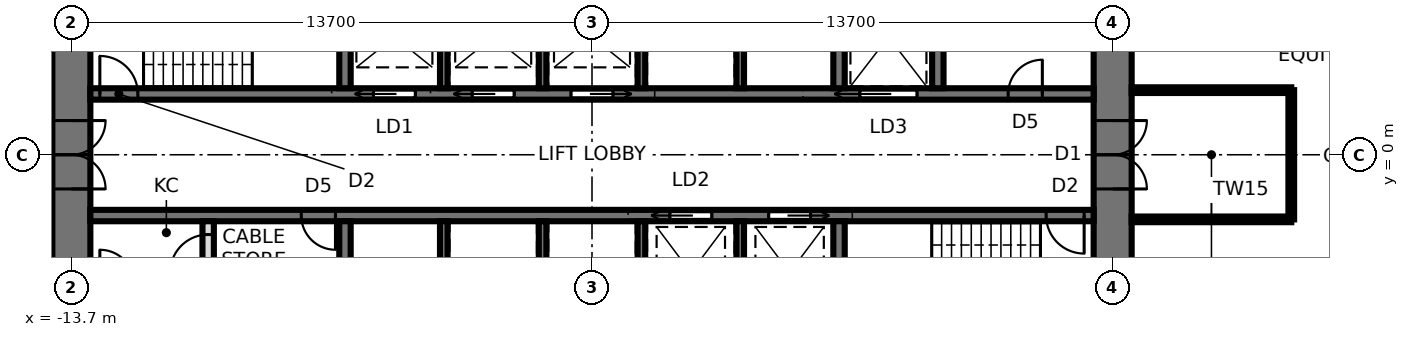
"""IFC4 building model, lengths in metres.
Left out: names, types, materials, properties, quantities, classifications, styles, units other than length and angle.
Written with IfcOpenShell. Run it as: python <this file> out.ifc"""

import sys

from ifc_helpers import new_model, si_unit, direction, frame, frame_2d, origin, place, context, subcontext, project, spatial, rectangle, extrude, element, fill, save


model = new_model("IFC4")
c1 = context("Model", 3, precision=1e-05, world=origin(), true_north=direction((0.0, 1.0)))
c2 = subcontext(c1, "Body", "Model", "MODEL_VIEW")
j1 = project(units=[si_unit("LENGTHUNIT", "METRE"), si_unit("PLANEANGLEUNIT", "RADIAN")], contexts=[c1])
p1 = place(None, origin())
s1 = spatial("IfcSite", under=j1, at=p1, CompositionType="ELEMENT")
p2 = place(p1, origin())
s2 = spatial("IfcBuilding", under=s1, at=p2, CompositionType="ELEMENT")
p3 = place(p2, frame((0.0, 0.0, 23.8)))
s3 = spatial("IfcBuildingStorey", under=s2, at=p3, CompositionType="ELEMENT", Elevation=23.8)
p4 = place(p3, frame((13.7, -9.5, 0.0), z_axis=(0.0, 0.0, 1.0), x_axis=(0.0, 1.0, 0.0)))
e1 = element("IfcWall", 1, at=p4, inside=s3, PredefinedType="SHEAR", context=c2, shape_type="SweptSolid", body=[
    extrude(rectangle(XDim=19.0, YDim=1.0, at=frame_2d((9.5, 0.0))), origin(), (0.0, 0.0, 1.0), 4.2),
])
p5 = place(p4, frame((8.6, 0.0, 0.0)))
e2 = element("IfcOpeningElement", 2, at=p5, cuts=e1, PredefinedType="OPENING", context=c2, shape_type="SweptSolid", body=[
    extrude(rectangle(XDim=1.8, YDim=2.4, at=frame_2d((0.9, 1.2))), frame((0.0, 0.51, 0.0), z_axis=(0.0, -1.0, 0.0), x_axis=(1.0, 0.0, 0.0)), (0.0, 0.0, 1.0), 1.02),
])
p6 = place(p3, frame((-13.7, 9.5, 0.0), z_axis=(0.0, 0.0, 1.0), x_axis=(0.0, -1.0, 0.0)))
e3 = element("IfcWall", 3, at=p6, inside=s3, PredefinedType="SHEAR", context=c2, shape_type="SweptSolid", body=[
    extrude(rectangle(XDim=19.0, YDim=1.0, at=frame_2d((9.5, 0.0))), origin(), (0.0, 0.0, 1.0), 4.2),
])
p7 = place(p6, frame((8.6, 0.0, 0.0)))
e4 = element("IfcOpeningElement", 4, at=p7, cuts=e3, PredefinedType="OPENING", context=c2, shape_type="SweptSolid", body=[
    extrude(rectangle(XDim=1.8, YDim=2.4, at=frame_2d((0.9, 1.2))), frame((0.0, 0.51, 0.0), z_axis=(0.0, -1.0, 0.0), x_axis=(1.0, 0.0, 0.0)), (0.0, 0.0, 1.0), 1.02),
])
p8 = place(p3, frame((-13.2, 1.6, 0.0), z_axis=(0.0, 0.0, 1.0), x_axis=(1.0, 0.0, 0.0)))
e5 = element("IfcWall", 5, at=p8, inside=s3, PredefinedType="SHEAR", context=c2, shape_type="SweptSolid", body=[
    extrude(rectangle(XDim=26.4, YDim=0.3, at=frame_2d((13.2, 0.0))), origin(), (0.0, 0.0, 1.0), 4.2),
])
p9 = place(p8, frame((0.25, 0.0, 0.0)))
e6 = element("IfcOpeningElement", 6, at=p9, cuts=e5, PredefinedType="OPENING", context=c2, shape_type="SweptSolid", body=[
    extrude(rectangle(XDim=1.0, YDim=2.1, at=frame_2d((0.5, 1.05))), frame((0.0, 0.16, 0.0), z_axis=(0.0, -1.0, 0.0), x_axis=(1.0, 0.0, 0.0)), (0.0, 0.0, 1.0), 0.32),
])
p10 = place(p8, frame((20.25, 0.0, 0.0)))
e7 = element("IfcOpeningElement", 7, at=p10, cuts=e5, PredefinedType="OPENING", context=c2, shape_type="SweptSolid", body=[
    extrude(rectangle(XDim=1.5, YDim=2.4, at=frame_2d((0.75, 1.2))), frame((0.0, 0.16, 0.0), z_axis=(0.0, -1.0, 0.0), x_axis=(1.0, 0.0, 0.0)), (0.0, 0.0, 1.0), 0.32),
])
p11 = place(p8, frame((7.45, 0.0, 0.0)))
e8 = element("IfcOpeningElement", 8, at=p11, cuts=e5, PredefinedType="OPENING", context=c2, shape_type="SweptSolid", body=[
    extrude(rectangle(XDim=1.1, YDim=2.3, at=frame_2d((0.55, 1.15))), frame((0.0, 0.16, 0.0), z_axis=(0.0, -1.0, 0.0), x_axis=(1.0, 0.0, 0.0)), (0.0, 0.0, 1.0), 0.32),
])
p12 = place(p8, frame((10.05, 0.0, 0.0)))
e9 = element("IfcOpeningElement", 9, at=p12, cuts=e5, PredefinedType="OPENING", context=c2, shape_type="SweptSolid", body=[
    extrude(rectangle(XDim=1.1, YDim=2.3, at=frame_2d((0.55, 1.15))), frame((0.0, 0.16, 0.0), z_axis=(0.0, -1.0, 0.0), x_axis=(1.0, 0.0, 0.0)), (0.0, 0.0, 1.0), 0.32),
])
p13 = place(p8, frame((12.65, 0.0, 0.0)))
e10 = element("IfcOpeningElement", 10, at=p13, cuts=e5, PredefinedType="OPENING", context=c2, shape_type="SweptSolid", body=[
    extrude(rectangle(XDim=1.1, YDim=2.3, at=frame_2d((0.55, 1.15))), frame((0.0, 0.16, 0.0), z_axis=(0.0, -1.0, 0.0), x_axis=(1.0, 0.0, 0.0)), (0.0, 0.0, 1.0), 0.32),
])
p14 = place(p8, frame((24.15, 0.0, 0.0)))
e11 = element("IfcOpeningElement", 11, at=p14, cuts=e5, PredefinedType="OPENING", context=c2, shape_type="SweptSolid", body=[
    extrude(rectangle(XDim=0.9, YDim=2.1, at=frame_2d((0.45, 1.05))), frame((0.0, 0.16, 0.0), z_axis=(0.0, -1.0, 0.0), x_axis=(1.0, 0.0, 0.0)), (0.0, 0.0, 1.0), 0.32),
])
p15 = place(p3, frame((-13.2, -1.6, 0.0), z_axis=(0.0, 0.0, 1.0), x_axis=(1.0, 0.0, 0.0)))
e12 = element("IfcWall", 12, at=p15, inside=s3, PredefinedType="SHEAR", context=c2, shape_type="SweptSolid", body=[
    extrude(rectangle(XDim=26.4, YDim=0.3, at=frame_2d((13.2, 0.0))), origin(), (0.0, 0.0, 1.0), 4.2),
])
p16 = place(p15, frame((25.15, 0.0, 0.0)))
e13 = element("IfcOpeningElement", 13, at=p16, cuts=e12, PredefinedType="OPENING", context=c2, shape_type="SweptSolid", body=[
    extrude(rectangle(XDim=1.0, YDim=2.1, at=frame_2d((0.5, 1.05))), frame((0.0, 0.16, 0.0), z_axis=(0.0, -1.0, 0.0), x_axis=(1.0, 0.0, 0.0)), (0.0, 0.0, 1.0), 0.32),
])
p17 = place(p15, frame((15.25, 0.0, 0.0)))
e14 = element("IfcOpeningElement", 14, at=p17, cuts=e12, PredefinedType="OPENING", context=c2, shape_type="SweptSolid", body=[
    extrude(rectangle(XDim=1.1, YDim=2.3, at=frame_2d((0.55, 1.15))), frame((0.0, 0.16, 0.0), z_axis=(0.0, -1.0, 0.0), x_axis=(1.0, 0.0, 0.0)), (0.0, 0.0, 1.0), 0.32),
])
p18 = place(p15, frame((17.85, 0.0, 0.0)))
e15 = element("IfcOpeningElement", 15, at=p18, cuts=e12, PredefinedType="OPENING", context=c2, shape_type="SweptSolid", body=[
    extrude(rectangle(XDim=1.1, YDim=2.3, at=frame_2d((0.55, 1.15))), frame((0.0, 0.16, 0.0), z_axis=(0.0, -1.0, 0.0), x_axis=(1.0, 0.0, 0.0)), (0.0, 0.0, 1.0), 0.32),
])
p19 = place(p15, frame((5.55, 0.0, 0.0)))
e16 = element("IfcOpeningElement", 16, at=p19, cuts=e12, PredefinedType="OPENING", context=c2, shape_type="SweptSolid", body=[
    extrude(rectangle(XDim=0.9, YDim=2.1, at=frame_2d((0.45, 1.05))), frame((0.0, 0.16, 0.0), z_axis=(0.0, -1.0, 0.0), x_axis=(1.0, 0.0, 0.0)), (0.0, 0.0, 1.0), 0.32),
])
for number, where, z_axis, x_axis in (
    (17, (-6.5, 1.75, 0.0), (0.0, 0.0, 1.0), (0.0, 1.0, 0.0)),
    (18, (6.5, 1.75, 0.0), (0.0, 0.0, 1.0), (0.0, 1.0, 0.0)),
):
    element("IfcWall", number, at=place(p3, frame(where, z_axis=z_axis, x_axis=x_axis)), inside=s3, PredefinedType="SHEAR", context=c2, shape_type="SweptSolid", body=[
        extrude(rectangle(XDim=2.7, YDim=0.3, at=frame_2d((1.35, 0.0))), origin(), (0.0, 0.0, 1.0), 4.2),
    ])
for number, where, z_axis, x_axis in (
    (19, (-3.9, 1.75, 0.0), (0.0, 0.0, 1.0), (0.0, 1.0, 0.0)),
    (20, (-1.3, 1.75, 0.0), (0.0, 0.0, 1.0), (0.0, 1.0, 0.0)),
    (21, (1.3, 1.75, 0.0), (0.0, 0.0, 1.0), (0.0, 1.0, 0.0)),
    (22, (3.9, 1.75, 0.0), (0.0, 0.0, 1.0), (0.0, 1.0, 0.0)),
):
    element("IfcWall", number, at=place(p3, frame(where, z_axis=z_axis, x_axis=x_axis)), inside=s3, PredefinedType="SHEAR", context=c2, shape_type="SweptSolid", body=[
        extrude(rectangle(XDim=2.7, YDim=0.2, at=frame_2d((1.35, 0.0))), origin(), (0.0, 0.0, 1.0), 4.2),
    ])
for number, where, z_axis, x_axis in (
    (23, (-6.5, -1.75, 0.0), (0.0, 0.0, 1.0), (0.0, -1.0, 0.0)),
    (24, (6.5, -1.75, 0.0), (0.0, 0.0, 1.0), (0.0, -1.0, 0.0)),
):
    element("IfcWall", number, at=place(p3, frame(where, z_axis=z_axis, x_axis=x_axis)), inside=s3, PredefinedType="SHEAR", context=c2, shape_type="SweptSolid", body=[
        extrude(rectangle(XDim=2.7, YDim=0.3, at=frame_2d((1.35, 0.0))), origin(), (0.0, 0.0, 1.0), 4.2),
    ])
for number, where, z_axis, x_axis in (
    (25, (-3.9, -1.75, 0.0), (0.0, 0.0, 1.0), (0.0, -1.0, 0.0)),
    (26, (-1.3, -1.75, 0.0), (0.0, 0.0, 1.0), (0.0, -1.0, 0.0)),
    (27, (1.3, -1.75, 0.0), (0.0, 0.0, 1.0), (0.0, -1.0, 0.0)),
    (28, (3.9, -1.75, 0.0), (0.0, 0.0, 1.0), (0.0, -1.0, 0.0)),
):
    element("IfcWall", number, at=place(p3, frame(where, z_axis=z_axis, x_axis=x_axis)), inside=s3, PredefinedType="SHEAR", context=c2, shape_type="SweptSolid", body=[
        extrude(rectangle(XDim=2.7, YDim=0.2, at=frame_2d((1.35, 0.0))), origin(), (0.0, 0.0, 1.0), 4.2),
    ])
p20 = place(p3, frame((9.1, 1.75, 0.0), z_axis=(0.0, 0.0, 1.0), x_axis=(0.0, 1.0, 0.0)))
e29 = element("IfcWall", 29, at=p20, inside=s3, PredefinedType="SHEAR", context=c2, shape_type="SweptSolid", body=[
    extrude(rectangle(XDim=2.7, YDim=0.3, at=frame_2d((1.35, 0.0))), origin(), (0.0, 0.0, 1.0), 4.2),
])
p21 = place(p3, frame((-10.1, -3.25, 0.0), z_axis=(0.0, 0.0, 1.0), x_axis=(0.0, 1.0, 0.0)))
e30 = element("IfcWall", 30, at=p21, inside=s3, PredefinedType="PARTITIONING", context=c2, shape_type="SweptSolid", body=[
    extrude(rectangle(XDim=1.5, YDim=0.3, at=frame_2d((0.75, 0.0))), origin(), (0.0, 0.0, 1.0), 4.04),
])
p22 = place(p21, frame((0.15, 0.0, 0.0)))
e31 = element("IfcOpeningElement", 31, at=p22, cuts=e30, PredefinedType="OPENING", context=c2, shape_type="SweptSolid", body=[
    extrude(rectangle(XDim=1.0, YDim=2.4, at=frame_2d((0.5, 1.2))), frame((0.0, 0.16, 0.0), z_axis=(0.0, -1.0, 0.0), x_axis=(1.0, 0.0, 0.0)), (0.0, 0.0, 1.0), 0.32),
])
p23 = place(p3, frame((14.2, -1.7, 0.0), z_axis=(0.0, 0.0, 1.0), x_axis=(1.0, 0.0, 0.0)))
e32 = element("IfcWall", 32, at=p23, inside=s3, PredefinedType="PARTITIONING", context=c2, shape_type="SweptSolid", body=[
    extrude(rectangle(XDim=4.2, YDim=0.15, at=frame_2d((2.1, 0.0))), origin(), (0.0, 0.0, 1.0), 4.04),
])
p24 = place(p3, frame((18.4, -1.7, 0.0), z_axis=(0.0, 0.0, 1.0), x_axis=(0.0, 1.0, 0.0)))
e33 = element("IfcWall", 33, at=p24, inside=s3, PredefinedType="PARTITIONING", context=c2, shape_type="SweptSolid", body=[
    extrude(rectangle(XDim=3.4, YDim=0.15, at=frame_2d((1.7, 0.0))), origin(), (0.0, 0.0, 1.0), 4.04),
])
p25 = place(p3, frame((18.4, 1.7, 0.0), z_axis=(0.0, 0.0, 1.0), x_axis=(-1.0, 0.0, 0.0)))
e34 = element("IfcWall", 34, at=p25, inside=s3, PredefinedType="PARTITIONING", context=c2, shape_type="SweptSolid", body=[
    extrude(rectangle(XDim=4.2, YDim=0.15, at=frame_2d((2.1, 0.0))), origin(), (0.0, 0.0, 1.0), 4.04),
])
p26 = place(p7, origin())
e35 = element("IfcDoor", 35, at=p26, inside=s3, OperationType="DOUBLE_DOOR_SINGLE_SWING", PredefinedType="DOOR", context=c2, shape_type="SweptSolid", body=[
    extrude(rectangle(XDim=1.72, YDim=2.36, at=frame_2d((0.9, 1.18))), frame((0.0, 0.025, 0.0), z_axis=(0.0, -1.0, 0.0), x_axis=(1.0, 0.0, 0.0)), (0.0, 0.0, 1.0), 0.05),
    extrude(rectangle(XDim=0.04, YDim=2.4, at=frame_2d((0.02, 1.2))), frame((0.0, 0.25, 0.0), z_axis=(0.0, -1.0, 0.0), x_axis=(1.0, 0.0, 0.0)), (0.0, 0.0, 1.0), 0.5),
    extrude(rectangle(XDim=0.04, YDim=2.4, at=frame_2d((1.78, 1.2))), frame((0.0, 0.25, 0.0), z_axis=(0.0, -1.0, 0.0), x_axis=(1.0, 0.0, 0.0)), (0.0, 0.0, 1.0), 0.5),
    extrude(rectangle(XDim=1.72, YDim=0.04, at=frame_2d((0.9, 2.38))), frame((0.0, 0.25, 0.0), z_axis=(0.0, -1.0, 0.0), x_axis=(1.0, 0.0, 0.0)), (0.0, 0.0, 1.0), 0.5),
])
fill(e4, e35)
p27 = place(p5, frame((1.8, 0.0, 0.0), z_axis=(0.0, 0.0, 1.0), x_axis=(-1.0, 0.0, 0.0)))
e36 = element("IfcDoor", 36, at=p27, inside=s3, OperationType="DOUBLE_DOOR_SINGLE_SWING", PredefinedType="DOOR", context=c2, shape_type="SweptSolid", body=[
    extrude(rectangle(XDim=1.72, YDim=2.36, at=frame_2d((0.9, 1.18))), frame((0.0, 0.025, 0.0), z_axis=(0.0, -1.0, 0.0), x_axis=(1.0, 0.0, 0.0)), (0.0, 0.0, 1.0), 0.05),
    extrude(rectangle(XDim=0.04, YDim=2.4, at=frame_2d((1.78, 1.2))), frame((0.0, 0.25, 0.0), z_axis=(0.0, -1.0, 0.0), x_axis=(1.0, 0.0, 0.0)), (0.0, 0.0, 1.0), 0.5),
    extrude(rectangle(XDim=0.04, YDim=2.4, at=frame_2d((0.02, 1.2))), frame((0.0, 0.25, 0.0), z_axis=(0.0, -1.0, 0.0), x_axis=(1.0, 0.0, 0.0)), (0.0, 0.0, 1.0), 0.5),
    extrude(rectangle(XDim=1.72, YDim=0.04, at=frame_2d((0.9, 2.38))), frame((0.0, 0.25, 0.0), z_axis=(0.0, -1.0, 0.0), x_axis=(1.0, 0.0, 0.0)), (0.0, 0.0, 1.0), 0.5),
])
fill(e2, e36)
p28 = place(p9, origin())
e37 = element("IfcDoor", 37, at=p28, inside=s3, OperationType="SINGLE_SWING_LEFT", PredefinedType="DOOR", context=c2, shape_type="SweptSolid", body=[
    extrude(rectangle(XDim=1.0, YDim=2.1, at=frame_2d((0.5, 1.05))), frame((0.0, 0.025, 0.0), z_axis=(0.0, -1.0, 0.0), x_axis=(1.0, 0.0, 0.0)), (0.0, 0.0, 1.0), 0.05),
])
fill(e6, e37)
p29 = place(p16, frame((1.0, 0.0, 0.0), z_axis=(0.0, 0.0, 1.0), x_axis=(-1.0, 0.0, 0.0)))
e38 = element("IfcDoor", 38, at=p29, inside=s3, OperationType="SINGLE_SWING_LEFT", PredefinedType="DOOR", context=c2, shape_type="SweptSolid", body=[
    extrude(rectangle(XDim=1.0, YDim=2.1, at=frame_2d((0.5, 1.05))), frame((0.0, 0.025, 0.0), z_axis=(0.0, -1.0, 0.0), x_axis=(1.0, 0.0, 0.0)), (0.0, 0.0, 1.0), 0.05),
])
fill(e13, e38)
p30 = place(p10, origin())
e39 = element("IfcDoor", 39, at=p30, inside=s3, OperationType="SLIDING_TO_LEFT", PredefinedType="DOOR", context=c2, shape_type="SweptSolid", body=[
    extrude(rectangle(XDim=1.5, YDim=2.4, at=frame_2d((0.75, 1.2))), frame((0.0, 0.025, 0.0), z_axis=(0.0, -1.0, 0.0), x_axis=(1.0, 0.0, 0.0)), (0.0, 0.0, 1.0), 0.05),
])
fill(e7, e39)
p31 = place(p11, origin())
e40 = element("IfcDoor", 40, at=p31, inside=s3, OperationType="SLIDING_TO_LEFT", PredefinedType="DOOR", context=c2, shape_type="SweptSolid", body=[
    extrude(rectangle(XDim=1.1, YDim=2.3, at=frame_2d((0.55, 1.15))), frame((0.0, 0.025, 0.0), z_axis=(0.0, -1.0, 0.0), x_axis=(1.0, 0.0, 0.0)), (0.0, 0.0, 1.0), 0.05),
])
fill(e8, e40)
p32 = place(p12, origin())
e41 = element("IfcDoor", 41, at=p32, inside=s3, OperationType="SLIDING_TO_LEFT", PredefinedType="DOOR", context=c2, shape_type="SweptSolid", body=[
    extrude(rectangle(XDim=1.1, YDim=2.3, at=frame_2d((0.55, 1.15))), frame((0.0, 0.025, 0.0), z_axis=(0.0, -1.0, 0.0), x_axis=(1.0, 0.0, 0.0)), (0.0, 0.0, 1.0), 0.05),
])
fill(e9, e41)
p33 = place(p13, origin())
e42 = element("IfcDoor", 42, at=p33, inside=s3, OperationType="SLIDING_TO_RIGHT", PredefinedType="DOOR", context=c2, shape_type="SweptSolid", body=[
    extrude(rectangle(XDim=1.1, YDim=2.3, at=frame_2d((0.55, 1.15))), frame((0.0, 0.025, 0.0), z_axis=(0.0, -1.0, 0.0), x_axis=(1.0, 0.0, 0.0)), (0.0, 0.0, 1.0), 0.05),
])
fill(e10, e42)
p34 = place(p17, frame((1.1, 0.0, 0.0), z_axis=(0.0, 0.0, 1.0), x_axis=(-1.0, 0.0, 0.0)))
e43 = element("IfcDoor", 43, at=p34, inside=s3, OperationType="SLIDING_TO_RIGHT", PredefinedType="DOOR", context=c2, shape_type="SweptSolid", body=[
    extrude(rectangle(XDim=1.1, YDim=2.3, at=frame_2d((0.55, 1.15))), frame((0.0, 0.025, 0.0), z_axis=(0.0, -1.0, 0.0), x_axis=(1.0, 0.0, 0.0)), (0.0, 0.0, 1.0), 0.05),
])
fill(e14, e43)
p35 = place(p18, frame((1.1, 0.0, 0.0), z_axis=(0.0, 0.0, 1.0), x_axis=(-1.0, 0.0, 0.0)))
e44 = element("IfcDoor", 44, at=p35, inside=s3, OperationType="SLIDING_TO_LEFT", PredefinedType="DOOR", context=c2, shape_type="SweptSolid", body=[
    extrude(rectangle(XDim=1.1, YDim=2.3, at=frame_2d((0.55, 1.15))), frame((0.0, 0.025, 0.0), z_axis=(0.0, -1.0, 0.0), x_axis=(1.0, 0.0, 0.0)), (0.0, 0.0, 1.0), 0.05),
])
fill(e15, e44)
p36 = place(p14, origin())
e45 = element("IfcDoor", 45, at=p36, inside=s3, OperationType="SINGLE_SWING_RIGHT", PredefinedType="DOOR", context=c2, shape_type="SweptSolid", body=[
    extrude(rectangle(XDim=0.9, YDim=2.1, at=frame_2d((0.45, 1.05))), frame((0.0, 0.025, 0.0), z_axis=(0.0, -1.0, 0.0), x_axis=(1.0, 0.0, 0.0)), (0.0, 0.0, 1.0), 0.05),
])
fill(e11, e45)
p37 = place(p19, frame((0.9, 0.0, 0.0), z_axis=(0.0, 0.0, 1.0), x_axis=(-1.0, 0.0, 0.0)))
e46 = element("IfcDoor", 46, at=p37, inside=s3, OperationType="SINGLE_SWING_LEFT", PredefinedType="DOOR", context=c2, shape_type="SweptSolid", body=[
    extrude(rectangle(XDim=0.9, YDim=2.1, at=frame_2d((0.45, 1.05))), frame((0.0, 0.025, 0.0), z_axis=(0.0, -1.0, 0.0), x_axis=(1.0, 0.0, 0.0)), (0.0, 0.0, 1.0), 0.05),
])
fill(e16, e46)
p38 = place(p22, origin())
e47 = element("IfcDoor", 47, at=p38, inside=s3, OperationType="SINGLE_SWING_LEFT", PredefinedType="DOOR", context=c2, shape_type="SweptSolid", body=[
    extrude(rectangle(XDim=1.0, YDim=2.4, at=frame_2d((0.5, 1.2))), frame((0.0, 0.025, 0.0), z_axis=(0.0, -1.0, 0.0), x_axis=(1.0, 0.0, 0.0)), (0.0, 0.0, 1.0), 0.05),
])
fill(e31, e47)
save(model, sys.argv[1])
